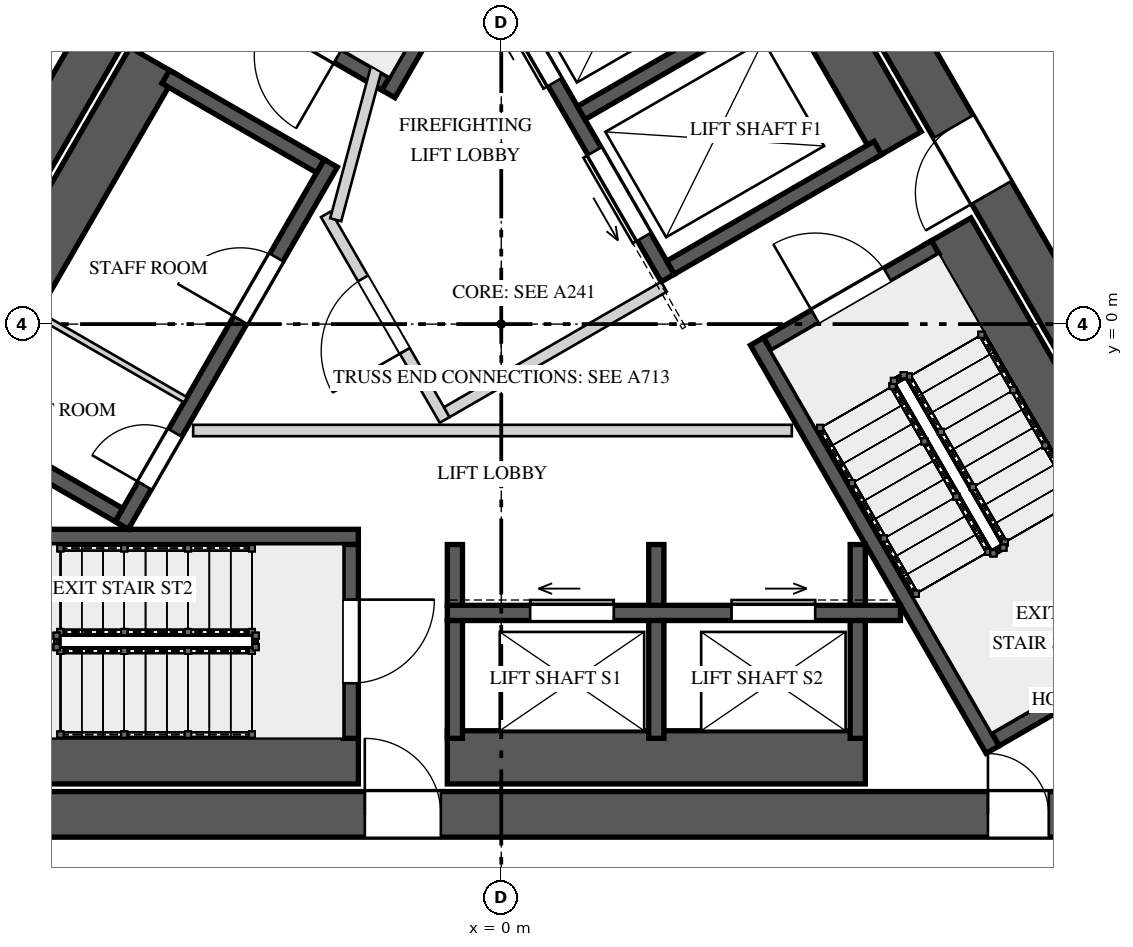
"""IFC4 building model, lengths in metres.
Left out: names, types, materials, properties, quantities, classifications, styles, units other than length and angle.
Written with IfcOpenShell. Run it as: python <this file> out.ifc"""

import sys

from ifc_helpers import new_model, si_unit, direction, frame, frame_2d, origin, place, context, subcontext, project, spatial, rectangle, extrude, element, fill, save


model = new_model("IFC4")
c1 = context("Model", 3, precision=1e-05, world=origin(), true_north=direction((0.0, 1.0)))
c2 = subcontext(c1, "Body", "Model", "MODEL_VIEW")
j1 = project(units=[si_unit("LENGTHUNIT", "METRE"), si_unit("PLANEANGLEUNIT", "RADIAN")], contexts=[c1])
p1 = place(None, origin())
s1 = spatial("IfcSite", under=j1, at=p1, CompositionType="ELEMENT")
p2 = place(p1, origin())
s2 = spatial("IfcBuilding", under=s1, at=p2, CompositionType="ELEMENT")
p3 = place(p2, frame((0.0, 0.0, 306.4)))
s3 = spatial("IfcBuildingStorey", under=s2, at=p3, CompositionType="ELEMENT", Elevation=306.4)
p4 = place(p3, frame((-1.27, 10.7, 0.0), z_axis=(0.0, 0.0, 1.0), x_axis=(-0.499999536116, -0.866025671608, 0.0)))
e1 = element("IfcWall", 1, at=p4, inside=s3, PredefinedType="SHEAR", context=c2, shape_type="SweptSolid", body=[
    extrude(rectangle(XDim=17.263, YDim=0.6, at=frame_2d((8.631, 0.0))), origin(), (0.0, 0.0, 1.0), 14.0),
])
p5 = place(p4, frame((6.836, 0.0, 0.0)))
e2 = element("IfcOpeningElement", 2, at=p5, cuts=e1, PredefinedType="OPENING", context=c2, shape_type="SweptSolid", body=[
    extrude(rectangle(XDim=1.0, YDim=2.4, at=frame_2d((0.5, 1.2))), frame((0.0, 0.31, 0.0), z_axis=(0.0, -1.0, 0.0), x_axis=(1.0, 0.0, 0.0)), (0.0, 0.0, 1.0), 0.62),
])
p6 = place(p3, frame((-8.631, -6.45, 0.0), z_axis=(0.0, 0.0, 1.0), x_axis=(1.0, 0.0, 0.0)))
e3 = element("IfcWall", 3, at=p6, inside=s3, PredefinedType="SHEAR", context=c2, shape_type="SweptSolid", body=[
    extrude(rectangle(XDim=17.263, YDim=0.6, at=frame_2d((8.631, 0.0))), origin(), (0.0, 0.0, 1.0), 14.0),
])
p7 = place(p6, frame((6.836, 0.0, 0.0)))
e4 = element("IfcOpeningElement", 4, at=p7, cuts=e3, PredefinedType="OPENING", context=c2, shape_type="SweptSolid", body=[
    extrude(rectangle(XDim=1.0, YDim=2.4, at=frame_2d((0.5, 1.2))), frame((0.0, 0.31, 0.0), z_axis=(0.0, -1.0, 0.0), x_axis=(1.0, 0.0, 0.0)), (0.0, 0.0, 1.0), 0.62),
])
p8 = place(p6, frame((15.034, 0.0, 0.0)))
e5 = element("IfcOpeningElement", 5, at=p8, cuts=e3, PredefinedType="OPENING", context=c2, shape_type="SweptSolid", body=[
    extrude(rectangle(XDim=0.8, YDim=2.1, at=frame_2d((0.4, 1.05))), frame((0.0, 0.31, 0.0), z_axis=(0.0, -1.0, 0.0), x_axis=(1.0, 0.0, 0.0)), (0.0, 0.0, 1.0), 0.62),
])
p9 = place(p3, frame((9.902, -4.25, 0.0), z_axis=(0.0, 0.0, 1.0), x_axis=(-0.499999536116, 0.866025671608, 0.0)))
e6 = element("IfcWall", 6, at=p9, inside=s3, PredefinedType="SHEAR", context=c2, shape_type="SweptSolid", body=[
    extrude(rectangle(XDim=17.263, YDim=0.6, at=frame_2d((8.631, 0.0))), origin(), (0.0, 0.0, 1.0), 14.0),
])
p10 = place(p9, frame((6.906, 0.0, 0.0)))
e7 = element("IfcOpeningElement", 7, at=p10, cuts=e6, PredefinedType="OPENING", context=c2, shape_type="SweptSolid", body=[
    extrude(rectangle(XDim=1.0, YDim=2.4, at=frame_2d((0.5, 1.2))), frame((0.0, 0.31, 0.0), z_axis=(0.0, -1.0, 0.0), x_axis=(1.0, 0.0, 0.0)), (0.0, 0.0, 1.0), 0.62),
])
p11 = place(p9, frame((14.567, 0.0, 0.0)))
e8 = element("IfcOpeningElement", 8, at=p11, cuts=e6, PredefinedType="OPENING", context=c2, shape_type="SweptSolid", body=[
    extrude(rectangle(XDim=0.8, YDim=2.1, at=frame_2d((0.4, 1.05))), frame((0.0, 0.31, 0.0), z_axis=(0.0, -1.0, 0.0), x_axis=(1.0, 0.0, 0.0)), (0.0, 0.0, 1.0), 0.62),
])
p12 = place(p3, frame((1.615, 8.397, 0.0), z_axis=(0.0, 0.0, 1.0), x_axis=(-0.500009909098, -0.866019682689, 0.0)))
e9 = element("IfcWall", 9, at=p12, inside=s3, PredefinedType="SOLIDWALL", context=c2, shape_type="SweptSolid", body=[
    extrude(rectangle(XDim=6.2, YDim=0.2, at=frame_2d((3.1, 0.0))), origin(), (0.0, 0.0, 1.0), 13.65),
])
p13 = place(p3, frame((-1.521, 3.165, 0.0), z_axis=(0.0, 0.0, 1.0), x_axis=(-0.866030925526, 0.499990435942, 0.0)))
e10 = element("IfcWall", 10, at=p13, inside=s3, PredefinedType="SOLIDWALL", context=c2, shape_type="SweptSolid", body=[
    extrude(rectangle(XDim=2.55, YDim=0.2, at=frame_2d((1.275, 0.0))), origin(), (0.0, 0.0, 1.0), 13.65),
])
p14 = place(p13, frame((0.725, 0.0, 0.0)))
e11 = element("IfcOpeningElement", 11, at=p14, cuts=e10, PredefinedType="OPENING", context=c2, shape_type="SweptSolid", body=[
    extrude(rectangle(XDim=1.1, YDim=2.4, at=frame_2d((0.55, 1.2))), frame((0.0, 0.11, 0.0), z_axis=(0.0, -1.0, 0.0), x_axis=(1.0, 0.0, 0.0)), (0.0, 0.0, 1.0), 0.22),
])
p15 = place(p3, frame((-8.08, -5.7, 0.0), z_axis=(0.0, 0.0, 1.0), x_axis=(1.0, 0.0, 0.0)))
e12 = element("IfcWall", 12, at=p15, inside=s3, PredefinedType="SOLIDWALL", context=c2, shape_type="SweptSolid", body=[
    extrude(rectangle(XDim=6.2, YDim=0.7, at=frame_2d((3.1, 0.0))), origin(), (0.0, 0.0, 1.0), 13.65),
])
p16 = place(p3, frame((-8.08, -2.8, 0.0), z_axis=(0.0, 0.0, 1.0), x_axis=(1.0, 0.0, 0.0)))
e13 = element("IfcWall", 13, at=p16, inside=s3, PredefinedType="SOLIDWALL", context=c2, shape_type="SweptSolid", body=[
    extrude(rectangle(XDim=6.2, YDim=0.2, at=frame_2d((3.1, 0.0))), origin(), (0.0, 0.0, 1.0), 13.65),
])
p17 = place(p3, frame((-1.98, -2.9, 0.0), z_axis=(0.0, 0.0, 1.0), x_axis=(0.0, -1.0, 0.0)))
e14 = element("IfcWall", 14, at=p17, inside=s3, PredefinedType="SOLIDWALL", context=c2, shape_type="SweptSolid", body=[
    extrude(rectangle(XDim=2.55, YDim=0.2, at=frame_2d((1.275, 0.0))), origin(), (0.0, 0.0, 1.0), 13.65),
])
p18 = place(p17, frame((0.725, 0.0, 0.0)))
e15 = element("IfcOpeningElement", 15, at=p18, cuts=e14, PredefinedType="OPENING", context=c2, shape_type="SweptSolid", body=[
    extrude(rectangle(XDim=1.1, YDim=2.4, at=frame_2d((0.55, 1.2))), frame((0.0, 0.11, 0.0), z_axis=(0.0, -1.0, 0.0), x_axis=(1.0, 0.0, 0.0)), (0.0, 0.0, 1.0), 0.22),
])
p19 = place(p3, frame((8.976, -4.147, 0.0), z_axis=(0.0, 0.0, 1.0), x_axis=(-0.49998037582, 0.866036733513, 0.0)))
e16 = element("IfcWall", 16, at=p19, inside=s3, PredefinedType="SOLIDWALL", context=c2, shape_type="SweptSolid", body=[
    extrude(rectangle(XDim=6.2, YDim=0.7, at=frame_2d((3.1, 0.0))), origin(), (0.0, 0.0, 1.0), 13.65),
])
p20 = place(p3, frame((6.465, -5.597, 0.0), z_axis=(0.0, 0.0, 1.0), x_axis=(-0.49998037582, 0.866036733513, 0.0)))
e17 = element("IfcWall", 17, at=p20, inside=s3, PredefinedType="SOLIDWALL", context=c2, shape_type="SweptSolid", body=[
    extrude(rectangle(XDim=6.2, YDim=0.2, at=frame_2d((3.1, 0.0))), origin(), (0.0, 0.0, 1.0), 13.65),
])
p21 = place(p3, frame((6.501, -5.461, 0.0), z_axis=(0.0, 0.0, 1.0), x_axis=(0.865989465428, 0.500062241894, 0.0)))
e18 = element("IfcWall", 18, at=p21, inside=s3, PredefinedType="SOLIDWALL", context=c2, shape_type="SweptSolid", body=[
    extrude(rectangle(XDim=2.55, YDim=0.2, at=frame_2d((1.275, 0.0))), origin(), (0.0, 0.0, 1.0), 13.65),
])
p22 = place(p3, frame((3.501, -0.265, 0.0), z_axis=(0.0, 0.0, 1.0), x_axis=(0.866030925526, 0.499990435942, 0.0)))
e19 = element("IfcWall", 19, at=p22, inside=s3, PredefinedType="SOLIDWALL", context=c2, shape_type="SweptSolid", body=[
    extrude(rectangle(XDim=2.55, YDim=0.2, at=frame_2d((1.275, 0.0))), origin(), (0.0, 0.0, 1.0), 13.65),
])
p23 = place(p22, frame((0.725, 0.0, 0.0)))
e20 = element("IfcOpeningElement", 20, at=p23, cuts=e19, PredefinedType="OPENING", context=c2, shape_type="SweptSolid", body=[
    extrude(rectangle(XDim=1.1, YDim=2.4, at=frame_2d((0.55, 1.2))), frame((0.0, 0.11, 0.0), z_axis=(0.0, -1.0, 0.0), x_axis=(1.0, 0.0, 0.0)), (0.0, 0.0, 1.0), 0.22),
])
p24 = place(p3, frame((-4.993, -2.648, 0.0), z_axis=(0.0, 0.0, 1.0), x_axis=(0.499996545922, 0.866027397988, 0.0)))
e21 = element("IfcWall", 21, at=p24, inside=s3, PredefinedType="SOLIDWALL", context=c2, shape_type="SweptSolid", body=[
    extrude(rectangle(XDim=5.5, YDim=0.2, at=frame_2d((2.75, 0.0))), origin(), (0.0, 0.0, 1.0), 13.65),
])
p25 = place(p24, frame((3.12, 0.0, 0.0)))
e22 = element("IfcOpeningElement", 22, at=p25, cuts=e21, PredefinedType="OPENING", context=c2, shape_type="SweptSolid", body=[
    extrude(rectangle(XDim=0.95, YDim=2.4, at=frame_2d((0.475, 1.2))), frame((0.0, 0.11, 0.0), z_axis=(0.0, -1.0, 0.0), x_axis=(1.0, 0.0, 0.0)), (0.0, 0.0, 1.0), 0.22),
])
p26 = place(p24, frame((0.605, 0.0, 0.0)))
e23 = element("IfcOpeningElement", 23, at=p26, cuts=e21, PredefinedType="OPENING", context=c2, shape_type="SweptSolid", body=[
    extrude(rectangle(XDim=0.8, YDim=2.1, at=frame_2d((0.4, 1.05))), frame((0.0, 0.11, 0.0), z_axis=(0.0, -1.0, 0.0), x_axis=(1.0, 0.0, 0.0)), (0.0, 0.0, 1.0), 0.22),
])
p27 = place(p3, frame((-4.581, 3.465, 0.0), z_axis=(0.0, 0.0, 1.0), x_axis=(-0.499996545922, -0.866027397988, 0.0)))
e24 = element("IfcWall", 24, at=p27, inside=s3, PredefinedType="SOLIDWALL", context=c2, shape_type="SweptSolid", body=[
    extrude(rectangle(XDim=5.5, YDim=0.7, at=frame_2d((2.75, 0.0))), origin(), (0.0, 0.0, 1.0), 13.65),
])
p28 = place(p3, frame((-2.38, 2.078, 0.0), z_axis=(0.0, 0.0, 1.0), x_axis=(-0.866061024631, 0.499938297808, 0.0)))
e25 = element("IfcWall", 25, at=p28, inside=s3, PredefinedType="SOLIDWALL", context=c2, shape_type="SweptSolid", body=[
    extrude(rectangle(XDim=2.35, YDim=0.2, at=frame_2d((1.175, 0.0))), origin(), (0.0, 0.0, 1.0), 13.65),
])
p29 = place(p3, frame((-5.03, -2.512, 0.0), z_axis=(0.0, 0.0, 1.0), x_axis=(-0.866016039709, 0.500016218704, 0.0)))
e26 = element("IfcWall", 26, at=p29, inside=s3, PredefinedType="SOLIDWALL", context=c2, shape_type="SweptSolid", body=[
    extrude(rectangle(XDim=2.35, YDim=0.2, at=frame_2d((1.175, 0.0))), origin(), (0.0, 0.0, 1.0), 13.65),
])
p30 = place(p3, frame((-4.155, -0.996, 0.0), z_axis=(0.0, 0.0, 1.0), x_axis=(-0.866016039709, 0.500016218704, 0.0)))
e27 = element("IfcWall", 27, at=p30, inside=s3, PredefinedType="PARTITIONING", context=c2, shape_type="SweptSolid", body=[
    extrude(rectangle(XDim=2.35, YDim=0.08, at=frame_2d((1.175, 0.0))), origin(), (0.0, 0.0, 1.0), 13.65),
])
p31 = place(p3, frame((-0.71, -3.8, 0.0), z_axis=(0.0, 0.0, 1.0), x_axis=(1.0, 0.0, 0.0)))
e28 = element("IfcWall", 28, at=p31, inside=s3, PredefinedType="SOLIDWALL", context=c2, shape_type="SweptSolid", body=[
    extrude(rectangle(XDim=5.961, YDim=0.2, at=frame_2d((2.981, 0.0))), origin(), (0.0, 0.0, 1.0), 13.65),
])
p32 = place(p31, frame((1.09, 0.0, 0.0)))
e29 = element("IfcOpeningElement", 29, at=p32, cuts=e28, PredefinedType="OPENING", context=c2, shape_type="SweptSolid", body=[
    extrude(rectangle(XDim=1.1, YDim=2.1, at=frame_2d((0.55, 1.05))), frame((0.0, 0.11, 0.0), z_axis=(0.0, -1.0, 0.0), x_axis=(1.0, 0.0, 0.0)), (0.0, 0.0, 1.0), 0.22),
])
p33 = place(p31, frame((3.74, 0.0, 0.0)))
e30 = element("IfcOpeningElement", 30, at=p33, cuts=e28, PredefinedType="OPENING", context=c2, shape_type="SweptSolid", body=[
    extrude(rectangle(XDim=1.1, YDim=2.1, at=frame_2d((0.55, 1.05))), frame((0.0, 0.11, 0.0), z_axis=(0.0, -1.0, 0.0), x_axis=(1.0, 0.0, 0.0)), (0.0, 0.0, 1.0), 0.22),
])
p34 = place(p3, frame((-0.71, -5.7, 0.0), z_axis=(0.0, 0.0, 1.0), x_axis=(1.0, 0.0, 0.0)))
e31 = element("IfcWall", 31, at=p34, inside=s3, PredefinedType="SOLIDWALL", context=c2, shape_type="SweptSolid", body=[
    extrude(rectangle(XDim=5.5, YDim=0.7, at=frame_2d((2.75, 0.0))), origin(), (0.0, 0.0, 1.0), 13.65),
])
p35 = place(p3, frame((-0.61, -3.9, 0.0), z_axis=(0.0, 0.0, 1.0), x_axis=(0.0, -1.0, 0.0)))
e32 = element("IfcWall", 32, at=p35, inside=s3, PredefinedType="SOLIDWALL", context=c2, shape_type="SweptSolid", body=[
    extrude(rectangle(XDim=1.55, YDim=0.2, at=frame_2d((0.775, 0.0))), origin(), (0.0, 0.0, 1.0), 13.65),
])
p36 = place(p3, frame((-0.61, -2.9, 0.0), z_axis=(0.0, 0.0, 1.0), x_axis=(0.0, -1.0, 0.0)))
e33 = element("IfcWall", 33, at=p36, inside=s3, PredefinedType="SOLIDWALL", context=c2, shape_type="SweptSolid", body=[
    extrude(rectangle(XDim=0.8, YDim=0.2, at=frame_2d((0.4, 0.0))), origin(), (0.0, 0.0, 1.0), 13.65),
])
p37 = place(p3, frame((2.04, -3.9, 0.0), z_axis=(0.0, 0.0, 1.0), x_axis=(0.0, -1.0, 0.0)))
e34 = element("IfcWall", 34, at=p37, inside=s3, PredefinedType="SOLIDWALL", context=c2, shape_type="SweptSolid", body=[
    extrude(rectangle(XDim=1.55, YDim=0.2, at=frame_2d((0.775, 0.0))), origin(), (0.0, 0.0, 1.0), 13.65),
])
p38 = place(p3, frame((2.04, -2.9, 0.0), z_axis=(0.0, 0.0, 1.0), x_axis=(0.0, -1.0, 0.0)))
e35 = element("IfcWall", 35, at=p38, inside=s3, PredefinedType="SOLIDWALL", context=c2, shape_type="SweptSolid", body=[
    extrude(rectangle(XDim=0.8, YDim=0.2, at=frame_2d((0.4, 0.0))), origin(), (0.0, 0.0, 1.0), 13.65),
])
p39 = place(p3, frame((4.69, -3.9, 0.0), z_axis=(0.0, 0.0, 1.0), x_axis=(0.0, -1.0, 0.0)))
e36 = element("IfcWall", 36, at=p39, inside=s3, PredefinedType="SOLIDWALL", context=c2, shape_type="SweptSolid", body=[
    extrude(rectangle(XDim=1.55, YDim=0.2, at=frame_2d((0.775, 0.0))), origin(), (0.0, 0.0, 1.0), 13.65),
])
p40 = place(p3, frame((4.69, -2.9, 0.0), z_axis=(0.0, 0.0, 1.0), x_axis=(0.0, -1.0, 0.0)))
e37 = element("IfcWall", 37, at=p40, inside=s3, PredefinedType="SOLIDWALL", context=c2, shape_type="SweptSolid", body=[
    extrude(rectangle(XDim=0.8, YDim=0.2, at=frame_2d((0.4, 0.0))), origin(), (0.0, 0.0, 1.0), 13.65),
])
p41 = place(p3, frame((2.19, 0.606, 0.0), z_axis=(0.0, 0.0, 1.0), x_axis=(-0.500002801628, 0.866023786258, 0.0)))
e38 = element("IfcWall", 38, at=p41, inside=s3, PredefinedType="SOLIDWALL", context=c2, shape_type="SweptSolid", body=[
    extrude(rectangle(XDim=4.9, YDim=0.2, at=frame_2d((2.45, 0.0))), origin(), (0.0, 0.0, 1.0), 13.65),
])
p42 = place(p41, frame((0.625, 0.0, 0.0)))
e39 = element("IfcOpeningElement", 39, at=p42, cuts=e38, PredefinedType="OPENING", context=c2, shape_type="SweptSolid", body=[
    extrude(rectangle(XDim=1.3, YDim=2.1, at=frame_2d((0.65, 1.05))), frame((0.0, 0.11, 0.0), z_axis=(0.0, -1.0, 0.0), x_axis=(1.0, 0.0, 0.0)), (0.0, 0.0, 1.0), 0.22),
])
p43 = place(p41, frame((2.975, 0.0, 0.0)))
e40 = element("IfcOpeningElement", 40, at=p43, cuts=e38, PredefinedType="OPENING", context=c2, shape_type="SweptSolid", body=[
    extrude(rectangle(XDim=1.3, YDim=2.1, at=frame_2d((0.65, 1.05))), frame((0.0, 0.11, 0.0), z_axis=(0.0, -1.0, 0.0), x_axis=(1.0, 0.0, 0.0)), (0.0, 0.0, 1.0), 0.22),
])
p44 = place(p3, frame((5.221, 2.356, 0.0), z_axis=(0.0, 0.0, 1.0), x_axis=(-0.500040169509, 0.866002210665, 0.0)))
e41 = element("IfcWall", 41, at=p44, inside=s3, PredefinedType="SOLIDWALL", context=c2, shape_type="SweptSolid", body=[
    extrude(rectangle(XDim=4.9, YDim=0.7, at=frame_2d((2.45, 0.0))), origin(), (0.0, 0.0, 1.0), 13.65),
])
for number, where, z_axis, x_axis in (
    (42, (2.227, 0.743, 0.0), (0.0, 0.0, 1.0), (0.866, 0.5, 0.0)),
    (43, (1.052, 2.778, 0.0), (0.0, 0.0, 1.0), (0.866, 0.5, 0.0)),
):
    element("IfcWall", number, at=place(p3, frame(where, z_axis=z_axis, x_axis=x_axis)), inside=s3, PredefinedType="SOLIDWALL", context=c2, shape_type="SweptSolid", body=[
        extrude(rectangle(XDim=3.15, YDim=0.2, at=frame_2d((1.575, 0.0))), origin(), (0.0, 0.0, 1.0), 13.65),
    ])
p45 = place(p3, frame((-0.744, -1.261, 0.0), z_axis=(0.0, 0.0, 1.0), x_axis=(-0.500004234368, 0.866022959057, 0.0)))
e44 = element("IfcWall", 44, at=p45, inside=s3, PredefinedType="PARTITIONING", context=c2, shape_type="SweptSolid", body=[
    extrude(rectangle(XDim=3.125, YDim=0.15, at=frame_2d((1.562, 0.0))), origin(), (0.0, 0.0, 1.0), 13.65),
])
p46 = place(p45, frame((1.05, 0.0, 0.0)))
e45 = element("IfcOpeningElement", 45, at=p46, cuts=e44, PredefinedType="OPENING", context=c2, shape_type="SweptSolid", body=[
    extrude(rectangle(XDim=1.1, YDim=2.4, at=frame_2d((0.55, 1.2))), frame((0.0, 0.085, 0.0), z_axis=(0.0, -1.0, 0.0), x_axis=(1.0, 0.0, 0.0)), (0.0, 0.0, 1.0), 0.17),
])
p47 = place(p3, frame((-0.717, -1.159, 0.0), z_axis=(0.0, 0.0, 1.0), x_axis=(0.866008176907, 0.50002983664, 0.0)))
e46 = element("IfcWall", 46, at=p47, inside=s3, PredefinedType="PARTITIONING", context=c2, shape_type="SweptSolid", body=[
    extrude(rectangle(XDim=3.3, YDim=0.15, at=frame_2d((1.65, 0.0))), origin(), (0.0, 0.0, 1.0), 13.65),
])
p48 = place(p3, frame((-2.178, 1.372, 0.0), z_axis=(0.0, 0.0, 1.0), x_axis=(0.258808958833, 0.96592852884, 0.0)))
e47 = element("IfcWall", 47, at=p48, inside=s3, PredefinedType="PARTITIONING", context=c2, shape_type="SweptSolid", body=[
    extrude(rectangle(XDim=2.903, YDim=0.15, at=frame_2d((1.451, 0.0))), origin(), (0.0, 0.0, 1.0), 13.65),
])
p49 = place(p3, frame((-4.053, -1.4, 0.0), z_axis=(0.0, 0.0, 1.0), x_axis=(1.0, 0.0, 0.0)))
e48 = element("IfcWall", 48, at=p49, inside=s3, PredefinedType="PARTITIONING", context=c2, shape_type="SweptSolid", body=[
    extrude(rectangle(XDim=7.876, YDim=0.15, at=frame_2d((3.938, 0.0))), origin(), (0.0, 0.0, 1.0), 13.65),
])
p50 = place(p14, origin())
e49 = element("IfcDoor", 49, at=p50, inside=s3, OperationType="SINGLE_SWING_RIGHT", PredefinedType="DOOR", context=c2, shape_type="SweptSolid", body=[
    extrude(rectangle(XDim=1.1, YDim=2.4, at=frame_2d((0.55, 1.2))), frame((0.0, 0.025, 0.0), z_axis=(0.0, -1.0, 0.0), x_axis=(1.0, 0.0, 0.0)), (0.0, 0.0, 1.0), 0.05),
])
fill(e11, e49)
p51 = place(p18, origin())
e50 = element("IfcDoor", 50, at=p51, inside=s3, OperationType="SINGLE_SWING_LEFT", PredefinedType="DOOR", context=c2, shape_type="SweptSolid", body=[
    extrude(rectangle(XDim=1.1, YDim=2.4, at=frame_2d((0.55, 1.2))), frame((0.0, 0.025, 0.0), z_axis=(0.0, -1.0, 0.0), x_axis=(1.0, 0.0, 0.0)), (0.0, 0.0, 1.0), 0.05),
])
fill(e15, e50)
p52 = place(p23, origin())
e51 = element("IfcDoor", 51, at=p52, inside=s3, OperationType="SINGLE_SWING_RIGHT", PredefinedType="DOOR", context=c2, shape_type="SweptSolid", body=[
    extrude(rectangle(XDim=1.1, YDim=2.4, at=frame_2d((0.55, 1.2))), frame((0.0, 0.025, 0.0), z_axis=(0.0, -1.0, 0.0), x_axis=(1.0, 0.0, 0.0)), (0.0, 0.0, 1.0), 0.05),
])
fill(e20, e51)
p53 = place(p25, origin())
e52 = element("IfcDoor", 52, at=p53, inside=s3, OperationType="SINGLE_SWING_LEFT", PredefinedType="DOOR", context=c2, shape_type="SweptSolid", body=[
    extrude(rectangle(XDim=0.95, YDim=2.4, at=frame_2d((0.475, 1.2))), frame((0.0, 0.025, 0.0), z_axis=(0.0, -1.0, 0.0), x_axis=(1.0, 0.0, 0.0)), (0.0, 0.0, 1.0), 0.05),
])
fill(e22, e52)
p54 = place(p26, origin())
e53 = element("IfcDoor", 53, at=p54, inside=s3, OperationType="SINGLE_SWING_RIGHT", PredefinedType="DOOR", context=c2, shape_type="SweptSolid", body=[
    extrude(rectangle(XDim=0.8, YDim=2.1, at=frame_2d((0.4, 1.05))), frame((0.0, 0.025, 0.0), z_axis=(0.0, -1.0, 0.0), x_axis=(1.0, 0.0, 0.0)), (0.0, 0.0, 1.0), 0.05),
])
fill(e23, e53)
p55 = place(p32, origin())
e54 = element("IfcDoor", 54, at=p55, inside=s3, OperationType="SLIDING_TO_LEFT", PredefinedType="DOOR", context=c2, shape_type="SweptSolid", body=[
    extrude(rectangle(XDim=1.1, YDim=2.1, at=frame_2d((0.55, 1.05))), frame((0.0, 0.025, 0.0), z_axis=(0.0, -1.0, 0.0), x_axis=(1.0, 0.0, 0.0)), (0.0, 0.0, 1.0), 0.05),
])
fill(e29, e54)
p56 = place(p33, origin())
e55 = element("IfcDoor", 55, at=p56, inside=s3, OperationType="SLIDING_TO_RIGHT", PredefinedType="DOOR", context=c2, shape_type="SweptSolid", body=[
    extrude(rectangle(XDim=1.1, YDim=2.1, at=frame_2d((0.55, 1.05))), frame((0.0, 0.025, 0.0), z_axis=(0.0, -1.0, 0.0), x_axis=(1.0, 0.0, 0.0)), (0.0, 0.0, 1.0), 0.05),
])
fill(e30, e55)
p57 = place(p42, origin())
e56 = element("IfcDoor", 56, at=p57, inside=s3, OperationType="SLIDING_TO_LEFT", PredefinedType="DOOR", context=c2, shape_type="SweptSolid", body=[
    extrude(rectangle(XDim=1.3, YDim=2.1, at=frame_2d((0.65, 1.05))), frame((0.0, 0.025, 0.0), z_axis=(0.0, -1.0, 0.0), x_axis=(1.0, 0.0, 0.0)), (0.0, 0.0, 1.0), 0.05),
])
fill(e39, e56)
p58 = place(p43, origin())
e57 = element("IfcDoor", 57, at=p58, inside=s3, OperationType="SLIDING_TO_RIGHT", PredefinedType="DOOR", context=c2, shape_type="SweptSolid", body=[
    extrude(rectangle(XDim=1.3, YDim=2.1, at=frame_2d((0.65, 1.05))), frame((0.0, 0.025, 0.0), z_axis=(0.0, -1.0, 0.0), x_axis=(1.0, 0.0, 0.0)), (0.0, 0.0, 1.0), 0.05),
])
fill(e40, e57)
p59 = place(p46, origin())
e58 = element("IfcDoor", 58, at=p59, inside=s3, OperationType="SINGLE_SWING_LEFT", PredefinedType="DOOR", context=c2, shape_type="SweptSolid", body=[
    extrude(rectangle(XDim=1.1, YDim=2.4, at=frame_2d((0.55, 1.2))), frame((0.0, 0.025, 0.0), z_axis=(0.0, -1.0, 0.0), x_axis=(1.0, 0.0, 0.0)), (0.0, 0.0, 1.0), 0.05),
])
fill(e45, e58)
p60 = place(p7, origin())
e59 = element("IfcDoor", 59, at=p60, inside=s3, OperationType="SINGLE_SWING_LEFT", PredefinedType="DOOR", context=c2, shape_type="SweptSolid", body=[
    extrude(rectangle(XDim=1.0, YDim=2.4, at=frame_2d((0.5, 1.2))), frame((0.0, 0.025, 0.0), z_axis=(0.0, -1.0, 0.0), x_axis=(1.0, 0.0, 0.0)), (0.0, 0.0, 1.0), 0.05),
])
fill(e4, e59)
p61 = place(p10, origin())
e60 = element("IfcDoor", 60, at=p61, inside=s3, OperationType="SINGLE_SWING_RIGHT", PredefinedType="DOOR", context=c2, shape_type="SweptSolid", body=[
    extrude(rectangle(XDim=1.0, YDim=2.4, at=frame_2d((0.5, 1.2))), frame((0.0, 0.025, 0.0), z_axis=(0.0, -1.0, 0.0), x_axis=(1.0, 0.0, 0.0)), (0.0, 0.0, 1.0), 0.05),
])
fill(e7, e60)
p62 = place(p8, origin())
e61 = element("IfcDoor", 61, at=p62, inside=s3, OperationType="SINGLE_SWING_LEFT", PredefinedType="DOOR", context=c2, shape_type="SweptSolid", body=[
    extrude(rectangle(XDim=0.8, YDim=2.1, at=frame_2d((0.4, 1.05))), frame((0.0, 0.025, 0.0), z_axis=(0.0, -1.0, 0.0), x_axis=(1.0, 0.0, 0.0)), (0.0, 0.0, 1.0), 0.05),
])
fill(e5, e61)
save(model, sys.argv[1])
